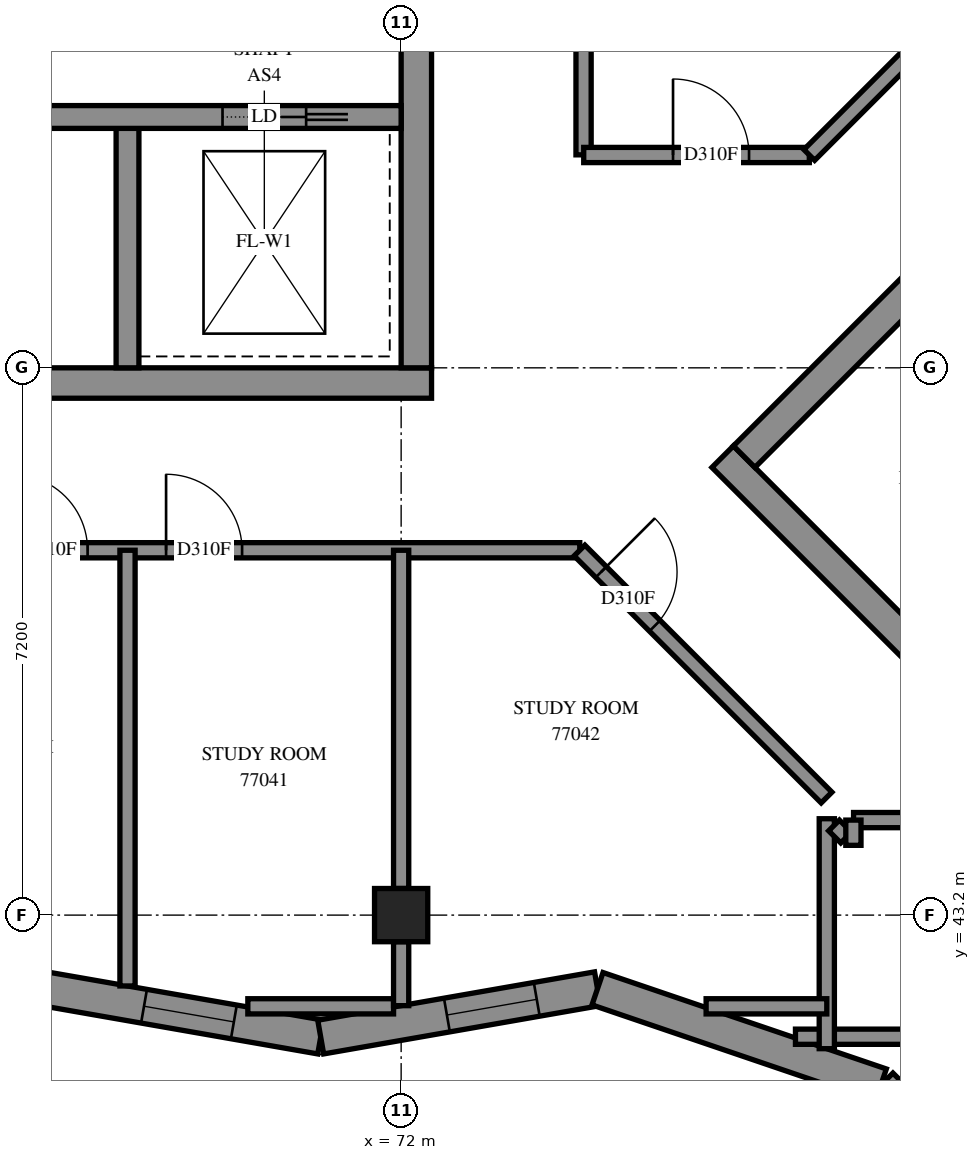
"""IFC4 building model, lengths in metres.
Left out: names, types, materials, properties, quantities, classifications, styles, units other than length and angle.
Written with IfcOpenShell. Run it as: python <this file> out.ifc"""

import sys

from ifc_helpers import new_model, si_unit, direction, frame, frame_2d, origin, origin_2d, place, context, subcontext, project, spatial, polyline, rectangle, outline, extrude, element, fill, save


model = new_model("IFC4")
c1 = context("Model", 3, precision=1e-05, world=origin(), true_north=direction((0.0, 1.0)))
c2 = subcontext(c1, "Body", "Model", "MODEL_VIEW")
j1 = project(units=[si_unit("LENGTHUNIT", "METRE"), si_unit("PLANEANGLEUNIT", "RADIAN")], contexts=[c1])
p1 = place(None, origin())
s1 = spatial("IfcSite", under=j1, at=p1, CompositionType="ELEMENT")
p2 = place(p1, origin())
s2 = spatial("IfcBuilding", under=s1, at=p2, CompositionType="ELEMENT")
p3 = place(p2, frame((0.0, 0.0, 281.2)))
s3 = spatial("IfcBuildingStorey", under=s2, at=p3, CompositionType="ELEMENT", Elevation=281.2)
p4 = place(p3, frame((72.0, 43.2, 0.0), z_axis=(0.0, 0.0, 1.0), x_axis=(1.0, 0.0, 0.0)))
e1 = element("IfcColumn", 1, at=p4, inside=s3, PredefinedType="COLUMN", context=c2, shape_type="SweptSolid", body=[
    extrude(rectangle(XDim=0.7, YDim=0.7, at=origin_2d()), origin(), (0.0, 0.0, 1.0), 3.1),
])
p5 = place(p3, frame((57.2, 50.2, -0.3), z_axis=(0.0, 0.0, 1.0), x_axis=(1.0, 0.0, 0.0)))
e2 = element("IfcWall", 2, at=p5, inside=s3, PredefinedType="SHEAR", context=c2, shape_type="SweptSolid", body=[
    extrude(rectangle(XDim=15.2, YDim=0.4, at=frame_2d((7.6, 0.0))), origin(), (0.0, 0.0, 1.0), 2.7),
])
p6 = place(p3, frame((72.2, 50.4, -0.3), z_axis=(0.0, 0.0, 1.0), x_axis=(0.0, 1.0, 0.0)))
e3 = element("IfcWall", 3, at=p6, inside=s3, PredefinedType="SHEAR", context=c2, shape_type="SweptSolid", body=[
    extrude(rectangle(XDim=14.4, YDim=0.4, at=frame_2d((7.2, 0.0))), origin(), (0.0, 0.0, 1.0), 2.7),
])
p7 = place(p6, frame((4.55, 0.0, 0.3)))
e4 = element("IfcOpeningElement", 4, at=p7, cuts=e3, PredefinedType="OPENING", context=c2, shape_type="SweptSolid", body=[
    extrude(rectangle(XDim=1.1, YDim=2.1, at=frame_2d((0.55, 1.05))), frame((0.0, 0.21, 0.0), z_axis=(0.0, -1.0, 0.0), x_axis=(1.0, 0.0, 0.0)), (0.0, 0.0, 1.0), 0.42),
])
p8 = place(p6, frame((11.35, 0.0, 0.3)))
e5 = element("IfcOpeningElement", 5, at=p8, cuts=e3, PredefinedType="OPENING", context=c2, shape_type="SweptSolid", body=[
    extrude(rectangle(XDim=1.1, YDim=2.1, at=frame_2d((0.55, 1.05))), frame((0.0, 0.21, 0.0), z_axis=(0.0, -1.0, 0.0), x_axis=(1.0, 0.0, 0.0)), (0.0, 0.0, 1.0), 0.42),
])
p9 = place(p3, frame((68.4, 50.4, 0.0), z_axis=(0.0, 0.0, 1.0), x_axis=(0.0, 1.0, 0.0)))
e6 = element("IfcWall", 6, at=p9, inside=s3, PredefinedType="SOLIDWALL", context=c2, shape_type="SweptSolid", body=[
    extrude(rectangle(XDim=3.3, YDim=0.3, at=frame_2d((1.65, 0.0))), origin(), (0.0, 0.0, 1.0), 3.1),
])
p10 = place(p3, frame((57.6, 53.7, 0.0), z_axis=(0.0, 0.0, 1.0), x_axis=(1.0, 0.0, 0.0)))
e7 = element("IfcWall", 7, at=p10, inside=s3, PredefinedType="SOLIDWALL", context=c2, shape_type="SweptSolid", body=[
    extrude(rectangle(XDim=14.4, YDim=0.3, at=frame_2d((7.2, 0.0))), origin(), (0.0, 0.0, 1.0), 3.1),
])
p11 = place(p10, frame((1.35, 0.0, 0.0)))
e8 = element("IfcOpeningElement", 8, at=p11, cuts=e7, PredefinedType="OPENING", context=c2, shape_type="SweptSolid", body=[
    extrude(rectangle(XDim=0.9, YDim=2.1, at=frame_2d((0.45, 1.05))), frame((0.0, 0.16, 0.0), z_axis=(0.0, -1.0, 0.0), x_axis=(1.0, 0.0, 0.0)), (0.0, 0.0, 1.0), 0.32),
])
p12 = place(p10, frame((4.95, 0.0, 0.0)))
e9 = element("IfcOpeningElement", 9, at=p12, cuts=e7, PredefinedType="OPENING", context=c2, shape_type="SweptSolid", body=[
    extrude(rectangle(XDim=0.9, YDim=2.1, at=frame_2d((0.45, 1.05))), frame((0.0, 0.16, 0.0), z_axis=(0.0, -1.0, 0.0), x_axis=(1.0, 0.0, 0.0)), (0.0, 0.0, 1.0), 0.32),
])
p13 = place(p10, frame((8.55, 0.0, 0.0)))
e10 = element("IfcOpeningElement", 10, at=p13, cuts=e7, PredefinedType="OPENING", context=c2, shape_type="SweptSolid", body=[
    extrude(rectangle(XDim=0.9, YDim=2.1, at=frame_2d((0.45, 1.05))), frame((0.0, 0.16, 0.0), z_axis=(0.0, -1.0, 0.0), x_axis=(1.0, 0.0, 0.0)), (0.0, 0.0, 1.0), 0.32),
])
p14 = place(p10, frame((12.05, 0.0, 0.0)))
e11 = element("IfcOpeningElement", 11, at=p14, cuts=e7, PredefinedType="OPENING", context=c2, shape_type="SweptSolid", body=[
    extrude(rectangle(XDim=1.1, YDim=2.1, at=frame_2d((0.55, 1.05))), frame((0.0, 0.16, 0.0), z_axis=(0.0, -1.0, 0.0), x_axis=(1.0, 0.0, 0.0)), (0.0, 0.0, 1.0), 0.32),
])
p15 = place(p3, frame((76.23, 49.231, -0.3), z_axis=(0.0, 0.0, 1.0), x_axis=(0.7071034917, -0.7071100706, 0.0)))
e12 = element("IfcWall", 12, at=p15, inside=s3, PredefinedType="SHEAR", context=c2, shape_type="SweptSolid", body=[
    extrude(rectangle(XDim=15.2, YDim=0.4, at=frame_2d((7.6, 0.0))), origin(), (0.0, 0.0, 1.0), 2.7),
])
p16 = place(p3, frame((76.513, 49.231, -0.3), z_axis=(0.0, 0.0, 1.0), x_axis=(0.7071067812, 0.7071067812, 0.0)))
e13 = element("IfcWall", 13, at=p16, inside=s3, PredefinedType="SHEAR", context=c2, shape_type="SweptSolid", body=[
    extrude(rectangle(XDim=14.4, YDim=0.4, at=frame_2d((7.2, 0.0))), origin(), (0.0, 0.0, 1.0), 2.7),
])
p17 = place(p16, frame((4.55, 0.0, 0.3)))
e14 = element("IfcOpeningElement", 14, at=p17, cuts=e13, PredefinedType="OPENING", context=c2, shape_type="SweptSolid", body=[
    extrude(rectangle(XDim=1.1, YDim=2.1, at=frame_2d((0.55, 1.05))), frame((0.0, 0.21, 0.0), z_axis=(0.0, -1.0, 0.0), x_axis=(1.0, 0.0, 0.0)), (0.0, 0.0, 1.0), 0.42),
])
p18 = place(p16, frame((11.35, 0.0, 0.3)))
e15 = element("IfcOpeningElement", 15, at=p18, cuts=e13, PredefinedType="OPENING", context=c2, shape_type="SweptSolid", body=[
    extrude(rectangle(XDim=1.1, YDim=2.1, at=frame_2d((0.55, 1.05))), frame((0.0, 0.21, 0.0), z_axis=(0.0, -1.0, 0.0), x_axis=(1.0, 0.0, 0.0)), (0.0, 0.0, 1.0), 0.42),
])
p19 = place(p3, frame((67.338, 42.225, 0.0), z_axis=(0.0, 0.0, 1.0), x_axis=(0.9850822859, -0.1720839619, 0.0)))
e16 = element("IfcWall", 16, at=p19, inside=s3, PredefinedType="SOLIDWALL", context=c2, shape_type="SweptSolid", body=[
    extrude(outline(polyline([(0.019, -0.225), (3.698, -0.225), (3.619, 0.225), (-0.019, 0.225), (0.019, -0.225)])), origin(), (0.0, 0.0, 1.0), 3.1),
])
p20 = place(p19, frame((1.299, 0.0, 0.45)))
e17 = element("IfcOpeningElement", 17, at=p20, cuts=e16, PredefinedType="OPENING", context=c2, shape_type="SweptSolid", body=[
    extrude(rectangle(XDim=1.2, YDim=2.55, at=frame_2d((0.6, 1.275))), frame((0.0, 0.235, 0.0), z_axis=(0.0, -1.0, 0.0), x_axis=(1.0, 0.0, 0.0)), (0.0, 0.0, 1.0), 0.47),
])
p21 = place(p3, frame((70.942, 41.595, 0.0), z_axis=(0.0, 0.0, 1.0), x_axis=(0.9850846186, 0.172070608, 0.0)))
e18 = element("IfcWall", 18, at=p21, inside=s3, PredefinedType="SOLIDWALL", context=c2, shape_type="SweptSolid", body=[
    extrude(outline(polyline([(-0.039, -0.225), (3.639, -0.225), (3.754, 0.225), (0.039, 0.225), (-0.039, -0.225)])), origin(), (0.0, 0.0, 1.0), 3.1),
])
p22 = place(p21, frame((1.685, 0.0, 0.45)))
e19 = element("IfcOpeningElement", 19, at=p22, cuts=e18, PredefinedType="OPENING", context=c2, shape_type="SweptSolid", body=[
    extrude(rectangle(XDim=1.2, YDim=2.55, at=frame_2d((0.6, 1.275))), frame((0.0, 0.235, 0.0), z_axis=(0.0, -1.0, 0.0), x_axis=(1.0, 0.0, 0.0)), (0.0, 0.0, 1.0), 0.47),
])
p23 = place(p3, frame((74.583, 42.231, 0.0), z_axis=(0.0, 0.0, 1.0), x_axis=(0.9466967117, -0.3221262734, 0.0)))
e20 = element("IfcWall", 20, at=p23, inside=s3, PredefinedType="SOLIDWALL", context=c2, shape_type="SweptSolid", body=[
    extrude(outline(polyline([(0.058, -0.225), (3.885, -0.225), (3.99, 0.225), (-0.058, 0.225), (0.058, -0.225)])), origin(), (0.0, 0.0, 1.0), 3.1),
])
p24 = place(p3, frame((78.311, 40.963, 0.0), z_axis=(0.0, 0.0, 1.0), x_axis=(0.7071067812, -0.7071067812, 0.0)))
e21 = element("IfcWall", 21, at=p24, inside=s3, PredefinedType="SOLIDWALL", context=c2, shape_type="SweptSolid", body=[
    extrude(outline(polyline([(0.052, -0.225), (15.882, -0.225), (15.432, 0.225), (-0.052, 0.225), (0.052, -0.225)])), origin(), (0.0, 0.0, 1.0), 3.1),
])
p25 = place(p24, frame((0.641, 0.0, 0.45)))
e22 = element("IfcOpeningElement", 22, at=p25, cuts=e21, PredefinedType="OPENING", context=c2, shape_type="SweptSolid", body=[
    extrude(rectangle(XDim=2.8, YDim=2.55, at=frame_2d((1.4, 1.275))), frame((0.0, 0.235, 0.0), z_axis=(0.0, -1.0, 0.0), x_axis=(1.0, 0.0, 0.0)), (0.0, 0.0, 1.0), 0.47),
])
p26 = place(p24, frame((4.282, 0.0, 0.45)))
e23 = element("IfcOpeningElement", 23, at=p26, cuts=e21, PredefinedType="OPENING", context=c2, shape_type="SweptSolid", body=[
    extrude(rectangle(XDim=2.8, YDim=2.55, at=frame_2d((1.4, 1.275))), frame((0.0, 0.235, 0.0), z_axis=(0.0, -1.0, 0.0), x_axis=(1.0, 0.0, 0.0)), (0.0, 0.0, 1.0), 0.47),
])
p27 = place(p24, frame((7.882, 0.0, 0.45)))
e24 = element("IfcOpeningElement", 24, at=p27, cuts=e21, PredefinedType="OPENING", context=c2, shape_type="SweptSolid", body=[
    extrude(rectangle(XDim=2.8, YDim=2.55, at=frame_2d((1.4, 1.275))), frame((0.0, 0.235, 0.0), z_axis=(0.0, -1.0, 0.0), x_axis=(1.0, 0.0, 0.0)), (0.0, 0.0, 1.0), 0.47),
])
p28 = place(p24, frame((11.482, 0.0, 0.45)))
e25 = element("IfcOpeningElement", 25, at=p28, cuts=e21, PredefinedType="OPENING", context=c2, shape_type="SweptSolid", body=[
    extrude(rectangle(XDim=2.8, YDim=2.55, at=frame_2d((1.4, 1.275))), frame((0.0, 0.235, 0.0), z_axis=(0.0, -1.0, 0.0), x_axis=(1.0, 0.0, 0.0)), (0.0, 0.0, 1.0), 0.47),
])
p29 = place(p3, frame((55.2, 48.0, 0.0), z_axis=(0.0, 0.0, 1.0), x_axis=(1.0, 0.0, 0.0)))
e26 = element("IfcWall", 26, at=p29, inside=s3, PredefinedType="PARTITIONING", context=c2, shape_type="SweptSolid", body=[
    extrude(rectangle(XDim=19.15, YDim=0.2, at=frame_2d((9.575, 0.0))), origin(), (0.0, 0.0, 1.0), 3.1),
])
p30 = place(p29, frame((6.243, 0.0, 0.0)))
e27 = element("IfcOpeningElement", 27, at=p30, cuts=e26, PredefinedType="OPENING", context=c2, shape_type="SweptSolid", body=[
    extrude(rectangle(XDim=0.9, YDim=2.1, at=frame_2d((0.45, 1.05))), frame((0.0, 0.11, 0.0), z_axis=(0.0, -1.0, 0.0), x_axis=(1.0, 0.0, 0.0)), (0.0, 0.0, 1.0), 0.22),
])
p31 = place(p29, frame((11.675, 0.0, 0.0)))
e28 = element("IfcOpeningElement", 28, at=p31, cuts=e26, PredefinedType="OPENING", context=c2, shape_type="SweptSolid", body=[
    extrude(rectangle(XDim=1.0, YDim=2.1, at=frame_2d((0.5, 1.05))), frame((0.0, 0.11, 0.0), z_axis=(0.0, -1.0, 0.0), x_axis=(1.0, 0.0, 0.0)), (0.0, 0.0, 1.0), 0.22),
])
p32 = place(p29, frame((13.707, 0.0, 0.0)))
e29 = element("IfcOpeningElement", 29, at=p32, cuts=e26, PredefinedType="OPENING", context=c2, shape_type="SweptSolid", body=[
    extrude(rectangle(XDim=1.0, YDim=2.1, at=frame_2d((0.5, 1.05))), frame((0.0, 0.11, 0.0), z_axis=(0.0, -1.0, 0.0), x_axis=(1.0, 0.0, 0.0)), (0.0, 0.0, 1.0), 0.22),
])
p33 = place(p3, frame((74.4, 53.202, 0.0), z_axis=(0.0, 0.0, 1.0), x_axis=(0.0, 1.0, 0.0)))
e30 = element("IfcWall", 30, at=p33, inside=s3, PredefinedType="PARTITIONING", context=c2, shape_type="SweptSolid", body=[
    extrude(rectangle(XDim=6.908, YDim=0.2, at=frame_2d((3.454, 0.0))), origin(), (0.0, 0.0, 1.0), 3.1),
])
p34 = place(p3, frame((68.4, 42.268, 0.0), z_axis=(0.0, 0.0, 1.0), x_axis=(0.0, 1.0, 0.0)))
e31 = element("IfcWall", 31, at=p34, inside=s3, PredefinedType="PARTITIONING", context=c2, shape_type="SweptSolid", body=[
    extrude(rectangle(XDim=5.732, YDim=0.2, at=frame_2d((2.866, 0.0))), origin(), (0.0, 0.0, 1.0), 3.1),
])
p35 = place(p3, frame((74.347, 47.997, 0.0), z_axis=(0.0, 0.0, 1.0), x_axis=(0.7071067812, -0.7071067812, 0.0)))
e32 = element("IfcWall", 32, at=p35, inside=s3, PredefinedType="PARTITIONING", context=c2, shape_type="SweptSolid", body=[
    extrude(rectangle(XDim=4.596, YDim=0.2, at=frame_2d((2.298, 0.0))), origin(), (0.0, 0.0, 1.0), 3.1),
])
p36 = place(p35, frame((0.401, 0.0, 0.0)))
e33 = element("IfcOpeningElement", 33, at=p36, cuts=e32, PredefinedType="OPENING", context=c2, shape_type="SweptSolid", body=[
    extrude(rectangle(XDim=1.0, YDim=2.1, at=frame_2d((0.5, 1.05))), frame((0.0, 0.11, 0.0), z_axis=(0.0, -1.0, 0.0), x_axis=(1.0, 0.0, 0.0)), (0.0, 0.0, 1.0), 0.22),
])
p37 = place(p3, frame((72.0, 43.55, 0.0), z_axis=(0.0, 0.0, 1.0), x_axis=(0.0, 1.0, 0.0)))
e34 = element("IfcWall", 34, at=p37, inside=s3, PredefinedType="PARTITIONING", context=c2, shape_type="SweptSolid", body=[
    extrude(rectangle(XDim=4.45, YDim=0.2, at=frame_2d((2.225, 0.0))), origin(), (0.0, 0.0, 1.0), 3.1),
])
p38 = place(p3, frame((77.188, 41.6, 0.0), z_axis=(0.0, 0.0, 1.0), x_axis=(1.0, 0.0, 0.0)))
e35 = element("IfcWall", 35, at=p38, inside=s3, PredefinedType="PARTITIONING", context=c2, shape_type="SweptSolid", body=[
    extrude(rectangle(XDim=3.28, YDim=0.2, at=frame_2d((1.64, 0.0))), origin(), (0.0, 0.0, 1.0), 3.1),
])
p39 = place(p3, frame((74.402, 53.2, 0.0), z_axis=(0.0, 0.0, 1.0), x_axis=(1.0, 0.0, 0.0)))
e36 = element("IfcWall", 36, at=p39, inside=s3, PredefinedType="PARTITIONING", context=c2, shape_type="SweptSolid", body=[
    extrude(rectangle(XDim=2.968, YDim=0.2, at=frame_2d((1.484, 0.0))), origin(), (0.0, 0.0, 1.0), 3.1),
])
p40 = place(p39, frame((1.175, 0.0, 0.0)))
e37 = element("IfcOpeningElement", 37, at=p40, cuts=e36, PredefinedType="OPENING", context=c2, shape_type="SweptSolid", body=[
    extrude(rectangle(XDim=1.0, YDim=2.1, at=frame_2d((0.5, 1.05))), frame((0.0, 0.11, 0.0), z_axis=(0.0, -1.0, 0.0), x_axis=(1.0, 0.0, 0.0)), (0.0, 0.0, 1.0), 0.22),
])
p41 = place(p3, frame((77.6, 41.443, 0.0), z_axis=(0.0, 0.0, 1.0), x_axis=(0.0, 1.0, 0.0)))
e38 = element("IfcWall", 38, at=p41, inside=s3, PredefinedType="PARTITIONING", context=c2, shape_type="SweptSolid", body=[
    extrude(rectangle(XDim=3.025, YDim=0.2, at=frame_2d((1.513, 0.0))), origin(), (0.0, 0.0, 1.0), 3.1),
])
p42 = place(p3, frame((77.37, 53.2, 0.0), z_axis=(0.0, 0.0, 1.0), x_axis=(0.7071067812, 0.7071067812, 0.0)))
e39 = element("IfcWall", 39, at=p42, inside=s3, PredefinedType="PARTITIONING", context=c2, shape_type="SweptSolid", body=[
    extrude(rectangle(XDim=2.786, YDim=0.2, at=frame_2d((1.393, 0.0))), origin(), (0.0, 0.0, 1.0), 3.1),
])
p43 = place(p3, frame((77.952, 44.45, 0.0), z_axis=(0.0, 0.0, 1.0), x_axis=(1.0, 0.0, 0.0)))
e40 = element("IfcWall", 40, at=p43, inside=s3, PredefinedType="PARTITIONING", context=c2, shape_type="SweptSolid", body=[
    extrude(rectangle(XDim=2.498, YDim=0.2, at=frame_2d((1.249, 0.0))), origin(), (0.0, 0.0, 1.0), 3.1),
])
p44 = place(p3, frame((69.983, 42.0, 0.0), z_axis=(0.0, 0.0, 1.0), x_axis=(1.0, 0.0, 0.0)))
e41 = element("IfcWall", 41, at=p44, inside=s3, PredefinedType="PARTITIONING", context=c2, shape_type="SweptSolid", body=[
    extrude(rectangle(XDim=1.917, YDim=0.2, at=frame_2d((0.959, 0.0))), origin(), (0.0, 0.0, 1.0), 3.1),
])
p45 = place(p3, frame((76.012, 42.0, 0.0), z_axis=(0.0, 0.0, 1.0), x_axis=(1.0, 0.0, 0.0)))
e42 = element("IfcWall", 42, at=p45, inside=s3, PredefinedType="PARTITIONING", context=c2, shape_type="SweptSolid", body=[
    extrude(rectangle(XDim=1.588, YDim=0.2, at=frame_2d((0.794, 0.0))), origin(), (0.0, 0.0, 1.0), 3.1),
])
p46 = place(p3, frame((72.0, 42.009, 0.0), z_axis=(0.0, 0.0, 1.0), x_axis=(0.0, 1.0, 0.0)))
e43 = element("IfcWall", 43, at=p46, inside=s3, PredefinedType="PARTITIONING", context=c2, shape_type="SweptSolid", body=[
    extrude(rectangle(XDim=0.841, YDim=0.2, at=frame_2d((0.421, 0.0))), origin(), (0.0, 0.0, 1.0), 3.1),
])
p47 = place(p3, frame((77.695, 44.38, 0.0), z_axis=(0.0, 0.0, 1.0), x_axis=(0.707329037, -0.7068844555, 0.0)))
e44 = element("IfcWall", 44, at=p47, inside=s3, PredefinedType="PARTITIONING", context=c2, shape_type="SweptSolid", body=[
    extrude(rectangle(XDim=0.225, YDim=0.2, at=frame_2d((0.112, 0.0))), origin(), (0.0, 0.0, 1.0), 3.1),
])
p48 = place(p3, frame((77.95, 44.118, 0.0), z_axis=(0.0, 0.0, 1.0), x_axis=(0.0, 1.0, 0.0)))
e45 = element("IfcWall", 45, at=p48, inside=s3, PredefinedType="PARTITIONING", context=c2, shape_type="SweptSolid", body=[
    extrude(rectangle(XDim=0.332, YDim=0.2, at=frame_2d((0.166, 0.0))), origin(), (0.0, 0.0, 1.0), 3.1),
])
p49 = place(p20, origin())
e46 = element("IfcWindow", 46, at=p49, inside=s3, PartitioningType="SINGLE_PANEL", PredefinedType="WINDOW", context=c2, shape_type="SweptSolid", body=[
    extrude(rectangle(XDim=1.2, YDim=2.55, at=frame_2d((0.6, 1.275))), frame((0.0, 0.205, 0.0), z_axis=(0.0, -1.0, 0.0), x_axis=(1.0, 0.0, 0.0)), (0.0, 0.0, 1.0), 0.06),
])
fill(e17, e46)
p50 = place(p22, origin())
e47 = element("IfcWindow", 47, at=p50, inside=s3, PartitioningType="SINGLE_PANEL", PredefinedType="WINDOW", context=c2, shape_type="SweptSolid", body=[
    extrude(rectangle(XDim=1.2, YDim=2.55, at=frame_2d((0.6, 1.275))), frame((0.0, 0.205, 0.0), z_axis=(0.0, -1.0, 0.0), x_axis=(1.0, 0.0, 0.0)), (0.0, 0.0, 1.0), 0.06),
])
fill(e19, e47)
p51 = place(p14, origin())
e48 = element("IfcDoor", 48, at=p51, inside=s3, OperationType="SLIDING_TO_RIGHT", PredefinedType="DOOR", context=c2, shape_type="SweptSolid", body=[
    extrude(rectangle(XDim=1.1, YDim=2.1, at=frame_2d((0.55, 1.05))), frame((0.0, 0.025, 0.0), z_axis=(0.0, -1.0, 0.0), x_axis=(1.0, 0.0, 0.0)), (0.0, 0.0, 1.0), 0.05),
])
fill(e11, e48)
p52 = place(p40, origin())
e49 = element("IfcDoor", 49, at=p52, inside=s3, OperationType="SINGLE_SWING_LEFT", PredefinedType="DOOR", context=c2, shape_type="SweptSolid", body=[
    extrude(rectangle(XDim=1.0, YDim=2.1, at=frame_2d((0.5, 1.05))), frame((0.0, 0.025, 0.0), z_axis=(0.0, -1.0, 0.0), x_axis=(1.0, 0.0, 0.0)), (0.0, 0.0, 1.0), 0.05),
])
fill(e37, e49)
p53 = place(p31, origin())
e50 = element("IfcDoor", 50, at=p53, inside=s3, OperationType="SINGLE_SWING_LEFT", PredefinedType="DOOR", context=c2, shape_type="SweptSolid", body=[
    extrude(rectangle(XDim=1.0, YDim=2.1, at=frame_2d((0.5, 1.05))), frame((0.0, 0.025, 0.0), z_axis=(0.0, -1.0, 0.0), x_axis=(1.0, 0.0, 0.0)), (0.0, 0.0, 1.0), 0.05),
])
fill(e28, e50)
p54 = place(p32, origin())
e51 = element("IfcDoor", 51, at=p54, inside=s3, OperationType="SINGLE_SWING_RIGHT", PredefinedType="DOOR", context=c2, shape_type="SweptSolid", body=[
    extrude(rectangle(XDim=1.0, YDim=2.1, at=frame_2d((0.5, 1.05))), frame((0.0, 0.025, 0.0), z_axis=(0.0, -1.0, 0.0), x_axis=(1.0, 0.0, 0.0)), (0.0, 0.0, 1.0), 0.05),
])
fill(e29, e51)
p55 = place(p36, origin())
e52 = element("IfcDoor", 52, at=p55, inside=s3, OperationType="SINGLE_SWING_LEFT", PredefinedType="DOOR", context=c2, shape_type="SweptSolid", body=[
    extrude(rectangle(XDim=1.0, YDim=2.1, at=frame_2d((0.5, 1.05))), frame((0.0, 0.025, 0.0), z_axis=(0.0, -1.0, 0.0), x_axis=(1.0, 0.0, 0.0)), (0.0, 0.0, 1.0), 0.05),
])
fill(e33, e52)
save(model, sys.argv[1])
